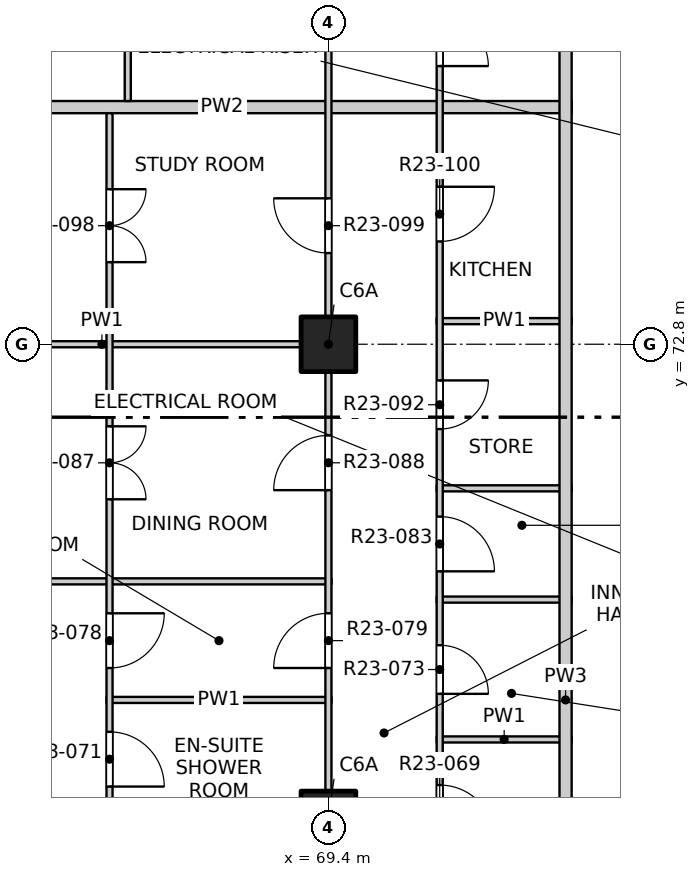
"""IFC4 building model, lengths in metres.
Left out: names, types, materials, properties, quantities, classifications, styles, units other than length and angle.
Written with IfcOpenShell. Run it as: python <this file> out.ifc"""

import sys

from ifc_helpers import new_model, si_unit, direction, frame, frame_2d, origin, origin_2d, place, context, subcontext, project, spatial, rectangle, extrude, element, fill, save


model = new_model("IFC4")
c1 = context("Model", 3, precision=1e-05, world=origin(), true_north=direction((0.0, 1.0)))
c2 = subcontext(c1, "Body", "Model", "MODEL_VIEW")
j1 = project(units=[si_unit("LENGTHUNIT", "METRE"), si_unit("PLANEANGLEUNIT", "RADIAN")], contexts=[c1])
p1 = place(None, origin())
s1 = spatial("IfcSite", under=j1, at=p1, CompositionType="ELEMENT")
p2 = place(p1, origin())
s2 = spatial("IfcBuilding", under=s1, at=p2, CompositionType="ELEMENT")
p3 = place(p2, frame((0.0, 0.0, 234.7)))
s3 = spatial("IfcBuildingStorey", under=s2, at=p3, CompositionType="ELEMENT", Elevation=234.7)
for number, where, z_axis, x_axis in (
    (1, (69.4, 65.0, -0.25), (0.0, 0.0, 1.0), (1.0, 0.0, 0.0)),
    (2, (69.4, 72.8, -0.25), (0.0, 0.0, 1.0), (1.0, 0.0, 0.0)),
):
    element("IfcColumn", number, at=place(p3, frame(where, z_axis=z_axis, x_axis=x_axis)), inside=s3, PredefinedType="COLUMN", context=c2, shape_type="SweptSolid", body=[
        extrude(rectangle(XDim=0.9, YDim=0.9, at=origin_2d()), origin(), (0.0, 0.0, 1.0), 3.4),
    ])
p4 = place(p3, frame((71.18, 66.3, 0.0), z_axis=(0.0, 0.0, 1.0), x_axis=(1.0, 0.0, 0.0)))
e3 = element("IfcWall", 3, at=p4, inside=s3, PredefinedType="PARTITIONING", context=c2, shape_type="SweptSolid", body=[
    extrude(rectangle(XDim=2.22, YDim=0.1, at=frame_2d((1.11, 0.0))), origin(), (0.0, 0.0, 1.0), 3.15),
])
p5 = place(p3, frame((65.75, 66.95, 0.0), z_axis=(0.0, 0.0, 1.0), x_axis=(1.0, 0.0, 0.0)))
e4 = element("IfcWall", 4, at=p5, inside=s3, PredefinedType="PARTITIONING", context=c2, shape_type="SweptSolid", body=[
    extrude(rectangle(XDim=3.7, YDim=0.1, at=frame_2d((1.85, 0.0))), origin(), (0.0, 0.0, 1.0), 3.15),
])
p6 = place(p3, frame((71.18, 68.6, 0.0), z_axis=(0.0, 0.0, 1.0), x_axis=(1.0, 0.0, 0.0)))
e5 = element("IfcWall", 5, at=p6, inside=s3, PredefinedType="PARTITIONING", context=c2, shape_type="SweptSolid", body=[
    extrude(rectangle(XDim=2.22, YDim=0.1, at=frame_2d((1.11, 0.0))), origin(), (0.0, 0.0, 1.0), 3.15),
])
p7 = place(p3, frame((61.9, 68.9, 0.0), z_axis=(0.0, 0.0, 1.0), x_axis=(1.0, 0.0, 0.0)))
e6 = element("IfcWall", 6, at=p7, inside=s3, PredefinedType="PARTITIONING", context=c2, shape_type="SweptSolid", body=[
    extrude(rectangle(XDim=7.55, YDim=0.1, at=frame_2d((3.775, 0.0))), origin(), (0.0, 0.0, 1.0), 2.55),
])
p8 = place(p3, frame((71.18, 70.43, 0.0), z_axis=(0.0, 0.0, 1.0), x_axis=(1.0, 0.0, 0.0)))
e7 = element("IfcWall", 7, at=p8, inside=s3, PredefinedType="PARTITIONING", context=c2, shape_type="SweptSolid", body=[
    extrude(rectangle(XDim=2.22, YDim=0.1, at=frame_2d((1.11, 0.0))), origin(), (0.0, 0.0, 1.0), 3.15),
])
p9 = place(p3, frame((61.9, 72.8, 0.0), z_axis=(0.0, 0.0, 1.0), x_axis=(1.0, 0.0, 0.0)))
e8 = element("IfcWall", 8, at=p9, inside=s3, PredefinedType="PARTITIONING", context=c2, shape_type="SweptSolid", body=[
    extrude(rectangle(XDim=7.55, YDim=0.1, at=frame_2d((3.775, 0.0))), origin(), (0.0, 0.0, 1.0), 3.15),
])
p10 = place(p3, frame((71.18, 73.18, 0.0), z_axis=(0.0, 0.0, 1.0), x_axis=(1.0, 0.0, 0.0)))
e9 = element("IfcWall", 9, at=p10, inside=s3, PredefinedType="PARTITIONING", context=c2, shape_type="SweptSolid", body=[
    extrude(rectangle(XDim=2.22, YDim=0.1, at=frame_2d((1.11, 0.0))), origin(), (0.0, 0.0, 1.0), 3.15),
])
p11 = place(p3, frame((61.9, 76.7, 0.0), z_axis=(0.0, 0.0, 1.0), x_axis=(1.0, 0.0, 0.0)))
e10 = element("IfcWall", 10, at=p11, inside=s3, PredefinedType="PARTITIONING", context=c2, shape_type="SweptSolid", body=[
    extrude(rectangle(XDim=11.5, YDim=0.2, at=frame_2d((5.75, 0.0))), origin(), (0.0, 0.0, 1.0), 2.55),
])
p12 = place(p3, frame((65.8, 61.2, 0.0), z_axis=(0.0, 0.0, 1.0), x_axis=(0.0, 1.0, 0.0)))
e11 = element("IfcWall", 11, at=p12, inside=s3, PredefinedType="PARTITIONING", context=c2, shape_type="SweptSolid", body=[
    extrude(rectangle(XDim=15.4, YDim=0.1, at=frame_2d((7.7, 0.0))), origin(), (0.0, 0.0, 1.0), 3.15),
])
p13 = place(p12, frame((0.425, 0.0, 0.0)))
e12 = element("IfcOpeningElement", 12, at=p13, cuts=e11, PredefinedType="OPENING", context=c2, shape_type="SweptSolid", body=[
    extrude(rectangle(XDim=0.9, YDim=2.1, at=frame_2d((0.45, 1.05))), frame((0.0, 0.06, 0.0), z_axis=(0.0, -1.0, 0.0), x_axis=(1.0, 0.0, 0.0)), (0.0, 0.0, 1.0), 0.12),
])
p14 = place(p12, frame((2.375, 0.0, 0.0)))
e13 = element("IfcOpeningElement", 13, at=p14, cuts=e11, PredefinedType="OPENING", context=c2, shape_type="SweptSolid", body=[
    extrude(rectangle(XDim=0.9, YDim=2.1, at=frame_2d((0.45, 1.05))), frame((0.0, 0.06, 0.0), z_axis=(0.0, -1.0, 0.0), x_axis=(1.0, 0.0, 0.0)), (0.0, 0.0, 1.0), 0.12),
])
p15 = place(p12, frame((4.325, 0.0, 0.0)))
e14 = element("IfcOpeningElement", 14, at=p15, cuts=e11, PredefinedType="OPENING", context=c2, shape_type="SweptSolid", body=[
    extrude(rectangle(XDim=0.9, YDim=2.1, at=frame_2d((0.45, 1.05))), frame((0.0, 0.06, 0.0), z_axis=(0.0, -1.0, 0.0), x_axis=(1.0, 0.0, 0.0)), (0.0, 0.0, 1.0), 0.12),
])
p16 = place(p12, frame((6.275, 0.0, 0.0)))
e15 = element("IfcOpeningElement", 15, at=p16, cuts=e11, PredefinedType="OPENING", context=c2, shape_type="SweptSolid", body=[
    extrude(rectangle(XDim=0.9, YDim=2.1, at=frame_2d((0.45, 1.05))), frame((0.0, 0.06, 0.0), z_axis=(0.0, -1.0, 0.0), x_axis=(1.0, 0.0, 0.0)), (0.0, 0.0, 1.0), 0.12),
])
p17 = place(p12, frame((9.05, 0.0, 0.0)))
e16 = element("IfcOpeningElement", 16, at=p17, cuts=e11, PredefinedType="OPENING", context=c2, shape_type="SweptSolid", body=[
    extrude(rectangle(XDim=1.2, YDim=2.1, at=frame_2d((0.6, 1.05))), frame((0.0, 0.06, 0.0), z_axis=(0.0, -1.0, 0.0), x_axis=(1.0, 0.0, 0.0)), (0.0, 0.0, 1.0), 0.12),
])
p18 = place(p12, frame((12.95, 0.0, 0.0)))
e17 = element("IfcOpeningElement", 17, at=p18, cuts=e11, PredefinedType="OPENING", context=c2, shape_type="SweptSolid", body=[
    extrude(rectangle(XDim=1.2, YDim=2.1, at=frame_2d((0.6, 1.05))), frame((0.0, 0.06, 0.0), z_axis=(0.0, -1.0, 0.0), x_axis=(1.0, 0.0, 0.0)), (0.0, 0.0, 1.0), 0.12),
])
p19 = place(p3, frame((66.1, 76.8, 0.0), z_axis=(0.0, 0.0, 1.0), x_axis=(0.0, 1.0, 0.0)))
e18 = element("IfcWall", 18, at=p19, inside=s3, PredefinedType="PARTITIONING", context=c2, shape_type="SweptSolid", body=[
    extrude(rectangle(XDim=11.3, YDim=0.1, at=frame_2d((5.65, 0.0))), origin(), (0.0, 0.0, 1.0), 3.15),
])
p20 = place(p19, frame((1.25, 0.0, 0.0)))
e19 = element("IfcOpeningElement", 19, at=p20, cuts=e18, PredefinedType="OPENING", context=c2, shape_type="SweptSolid", body=[
    extrude(rectangle(XDim=1.2, YDim=2.1, at=frame_2d((0.6, 1.05))), frame((0.0, 0.06, 0.0), z_axis=(0.0, -1.0, 0.0), x_axis=(1.0, 0.0, 0.0)), (0.0, 0.0, 1.0), 0.12),
])
p21 = place(p19, frame((5.15, 0.0, 0.0)))
e20 = element("IfcOpeningElement", 20, at=p21, cuts=e18, PredefinedType="OPENING", context=c2, shape_type="SweptSolid", body=[
    extrude(rectangle(XDim=1.2, YDim=2.1, at=frame_2d((0.6, 1.05))), frame((0.0, 0.06, 0.0), z_axis=(0.0, -1.0, 0.0), x_axis=(1.0, 0.0, 0.0)), (0.0, 0.0, 1.0), 0.12),
])
p22 = place(p19, frame((9.05, 0.0, 0.0)))
e21 = element("IfcOpeningElement", 21, at=p22, cuts=e18, PredefinedType="OPENING", context=c2, shape_type="SweptSolid", body=[
    extrude(rectangle(XDim=1.2, YDim=2.1, at=frame_2d((0.6, 1.05))), frame((0.0, 0.06, 0.0), z_axis=(0.0, -1.0, 0.0), x_axis=(1.0, 0.0, 0.0)), (0.0, 0.0, 1.0), 0.12),
])
p23 = place(p3, frame((69.4, 41.9, 0.0), z_axis=(0.0, 0.0, 1.0), x_axis=(0.0, 1.0, 0.0)))
e22 = element("IfcWall", 22, at=p23, inside=s3, PredefinedType="PARTITIONING", context=c2, shape_type="SweptSolid", body=[
    extrude(rectangle(XDim=46.2, YDim=0.1, at=frame_2d((23.1, 0.0))), origin(), (0.0, 0.0, 1.0), 3.15),
])
p24 = place(p23, frame((1.2, 0.0, 0.0)))
e23 = element("IfcOpeningElement", 23, at=p24, cuts=e22, PredefinedType="OPENING", context=c2, shape_type="SweptSolid", body=[
    extrude(rectangle(XDim=0.9, YDim=2.1, at=frame_2d((0.45, 1.05))), frame((0.0, 0.06, 0.0), z_axis=(0.0, -1.0, 0.0), x_axis=(1.0, 0.0, 0.0)), (0.0, 0.0, 1.0), 0.12),
])
p25 = place(p23, frame((6.025, 0.0, 0.0)))
e24 = element("IfcOpeningElement", 24, at=p25, cuts=e22, PredefinedType="OPENING", context=c2, shape_type="SweptSolid", body=[
    extrude(rectangle(XDim=0.9, YDim=2.1, at=frame_2d((0.45, 1.05))), frame((0.0, 0.06, 0.0), z_axis=(0.0, -1.0, 0.0), x_axis=(1.0, 0.0, 0.0)), (0.0, 0.0, 1.0), 0.12),
])
p26 = place(p23, frame((9.975, 0.0, 0.0)))
e25 = element("IfcOpeningElement", 25, at=p26, cuts=e22, PredefinedType="OPENING", context=c2, shape_type="SweptSolid", body=[
    extrude(rectangle(XDim=0.9, YDim=2.1, at=frame_2d((0.45, 1.05))), frame((0.0, 0.06, 0.0), z_axis=(0.0, -1.0, 0.0), x_axis=(1.0, 0.0, 0.0)), (0.0, 0.0, 1.0), 0.12),
])
p27 = place(p23, frame((12.9, 0.0, 0.0)))
e26 = element("IfcOpeningElement", 26, at=p27, cuts=e22, PredefinedType="OPENING", context=c2, shape_type="SweptSolid", body=[
    extrude(rectangle(XDim=0.9, YDim=2.1, at=frame_2d((0.45, 1.05))), frame((0.0, 0.06, 0.0), z_axis=(0.0, -1.0, 0.0), x_axis=(1.0, 0.0, 0.0)), (0.0, 0.0, 1.0), 0.12),
])
p28 = place(p23, frame((17.775, 0.0, 0.0)))
e27 = element("IfcOpeningElement", 27, at=p28, cuts=e22, PredefinedType="OPENING", context=c2, shape_type="SweptSolid", body=[
    extrude(rectangle(XDim=0.9, YDim=2.1, at=frame_2d((0.45, 1.05))), frame((0.0, 0.06, 0.0), z_axis=(0.0, -1.0, 0.0), x_axis=(1.0, 0.0, 0.0)), (0.0, 0.0, 1.0), 0.12),
])
p29 = place(p23, frame((21.625, 0.0, 0.0)))
e28 = element("IfcOpeningElement", 28, at=p29, cuts=e22, PredefinedType="OPENING", context=c2, shape_type="SweptSolid", body=[
    extrude(rectangle(XDim=0.9, YDim=2.1, at=frame_2d((0.45, 1.05))), frame((0.0, 0.06, 0.0), z_axis=(0.0, -1.0, 0.0), x_axis=(1.0, 0.0, 0.0)), (0.0, 0.0, 1.0), 0.12),
])
p30 = place(p23, frame((25.575, 0.0, 0.0)))
e29 = element("IfcOpeningElement", 29, at=p30, cuts=e22, PredefinedType="OPENING", context=c2, shape_type="SweptSolid", body=[
    extrude(rectangle(XDim=0.9, YDim=2.1, at=frame_2d((0.45, 1.05))), frame((0.0, 0.06, 0.0), z_axis=(0.0, -1.0, 0.0), x_axis=(1.0, 0.0, 0.0)), (0.0, 0.0, 1.0), 0.12),
])
p31 = place(p23, frame((28.5, 0.0, 0.0)))
e30 = element("IfcOpeningElement", 30, at=p31, cuts=e22, PredefinedType="OPENING", context=c2, shape_type="SweptSolid", body=[
    extrude(rectangle(XDim=0.9, YDim=2.1, at=frame_2d((0.45, 1.05))), frame((0.0, 0.06, 0.0), z_axis=(0.0, -1.0, 0.0), x_axis=(1.0, 0.0, 0.0)), (0.0, 0.0, 1.0), 0.12),
])
p32 = place(p23, frame((32.4, 0.0, 0.0)))
e31 = element("IfcOpeningElement", 31, at=p32, cuts=e22, PredefinedType="OPENING", context=c2, shape_type="SweptSolid", body=[
    extrude(rectangle(XDim=0.9, YDim=2.1, at=frame_2d((0.45, 1.05))), frame((0.0, 0.06, 0.0), z_axis=(0.0, -1.0, 0.0), x_axis=(1.0, 0.0, 0.0)), (0.0, 0.0, 1.0), 0.12),
])
p33 = place(p23, frame((36.3, 0.0, 0.0)))
e32 = element("IfcOpeningElement", 32, at=p33, cuts=e22, PredefinedType="OPENING", context=c2, shape_type="SweptSolid", body=[
    extrude(rectangle(XDim=0.9, YDim=2.1, at=frame_2d((0.45, 1.05))), frame((0.0, 0.06, 0.0), z_axis=(0.0, -1.0, 0.0), x_axis=(1.0, 0.0, 0.0)), (0.0, 0.0, 1.0), 0.12),
])
p34 = place(p23, frame((40.2, 0.0, 0.0)))
e33 = element("IfcOpeningElement", 33, at=p34, cuts=e22, PredefinedType="OPENING", context=c2, shape_type="SweptSolid", body=[
    extrude(rectangle(XDim=0.9, YDim=2.1, at=frame_2d((0.45, 1.05))), frame((0.0, 0.06, 0.0), z_axis=(0.0, -1.0, 0.0), x_axis=(1.0, 0.0, 0.0)), (0.0, 0.0, 1.0), 0.12),
])
p35 = place(p23, frame((44.1, 0.0, 0.0)))
e34 = element("IfcOpeningElement", 34, at=p35, cuts=e22, PredefinedType="OPENING", context=c2, shape_type="SweptSolid", body=[
    extrude(rectangle(XDim=0.9, YDim=2.1, at=frame_2d((0.45, 1.05))), frame((0.0, 0.06, 0.0), z_axis=(0.0, -1.0, 0.0), x_axis=(1.0, 0.0, 0.0)), (0.0, 0.0, 1.0), 0.12),
])
p36 = place(p3, frame((71.23, 63.95, 0.0), z_axis=(0.0, 0.0, 1.0), x_axis=(0.0, 1.0, 0.0)))
e35 = element("IfcWall", 35, at=p36, inside=s3, PredefinedType="PARTITIONING", context=c2, shape_type="SweptSolid", body=[
    extrude(rectangle(XDim=17.85, YDim=0.1, at=frame_2d((8.925, 0.0))), origin(), (0.0, 0.0, 1.0), 3.15),
])
p37 = place(p36, frame((0.7, 0.0, 0.0)))
e36 = element("IfcOpeningElement", 36, at=p37, cuts=e35, PredefinedType="OPENING", context=c2, shape_type="SweptSolid", body=[
    extrude(rectangle(XDim=0.9, YDim=2.1, at=frame_2d((0.45, 1.05))), frame((0.0, 0.06, 0.0), z_axis=(0.0, -1.0, 0.0), x_axis=(1.0, 0.0, 0.0)), (0.0, 0.0, 1.0), 0.12),
])
p38 = place(p36, frame((3.1, 0.0, 0.0)))
e37 = element("IfcOpeningElement", 37, at=p38, cuts=e35, PredefinedType="OPENING", context=c2, shape_type="SweptSolid", body=[
    extrude(rectangle(XDim=0.8, YDim=2.1, at=frame_2d((0.4, 1.05))), frame((0.0, 0.06, 0.0), z_axis=(0.0, -1.0, 0.0), x_axis=(1.0, 0.0, 0.0)), (0.0, 0.0, 1.0), 0.12),
])
p39 = place(p36, frame((5.115, 0.0, 0.0)))
e38 = element("IfcOpeningElement", 38, at=p39, cuts=e35, PredefinedType="OPENING", context=c2, shape_type="SweptSolid", body=[
    extrude(rectangle(XDim=0.9, YDim=2.1, at=frame_2d((0.45, 1.05))), frame((0.0, 0.06, 0.0), z_axis=(0.0, -1.0, 0.0), x_axis=(1.0, 0.0, 0.0)), (0.0, 0.0, 1.0), 0.12),
])
p40 = place(p36, frame((7.455, 0.0, 0.0)))
e39 = element("IfcOpeningElement", 39, at=p40, cuts=e35, PredefinedType="OPENING", context=c2, shape_type="SweptSolid", body=[
    extrude(rectangle(XDim=0.8, YDim=2.1, at=frame_2d((0.4, 1.05))), frame((0.0, 0.06, 0.0), z_axis=(0.0, -1.0, 0.0), x_axis=(1.0, 0.0, 0.0)), (0.0, 0.0, 1.0), 0.12),
])
p41 = place(p36, frame((10.54, 0.0, 0.0)))
e40 = element("IfcOpeningElement", 40, at=p41, cuts=e35, PredefinedType="OPENING", context=c2, shape_type="SweptSolid", body=[
    extrude(rectangle(XDim=0.9, YDim=2.1, at=frame_2d((0.45, 1.05))), frame((0.0, 0.06, 0.0), z_axis=(0.0, -1.0, 0.0), x_axis=(1.0, 0.0, 0.0)), (0.0, 0.0, 1.0), 0.12),
])
p42 = place(p36, frame((13.425, 0.0, 0.0)))
e41 = element("IfcOpeningElement", 41, at=p42, cuts=e35, PredefinedType="OPENING", context=c2, shape_type="SweptSolid", body=[
    extrude(rectangle(XDim=0.8, YDim=2.1, at=frame_2d((0.4, 1.05))), frame((0.0, 0.06, 0.0), z_axis=(0.0, -1.0, 0.0), x_axis=(1.0, 0.0, 0.0)), (0.0, 0.0, 1.0), 0.12),
])
p43 = place(p36, frame((15.95, 0.0, 0.0)))
e42 = element("IfcOpeningElement", 42, at=p43, cuts=e35, PredefinedType="OPENING", context=c2, shape_type="SweptSolid", body=[
    extrude(rectangle(XDim=0.9, YDim=2.1, at=frame_2d((0.45, 1.05))), frame((0.0, 0.06, 0.0), z_axis=(0.0, -1.0, 0.0), x_axis=(1.0, 0.0, 0.0)), (0.0, 0.0, 1.0), 0.12),
])
p44 = place(p3, frame((73.3, 49.5, 0.0), z_axis=(0.0, 0.0, 1.0), x_axis=(0.0, 1.0, 0.0)))
e43 = element("IfcWall", 43, at=p44, inside=s3, PredefinedType="PARTITIONING", context=c2, shape_type="SweptSolid", body=[
    extrude(rectangle(XDim=34.9, YDim=0.2, at=frame_2d((17.45, 0.0))), origin(), (0.0, 0.0, 1.0), 3.15),
])
p45 = place(p44, frame((3.075, 0.0, 0.0)))
e44 = element("IfcOpeningElement", 44, at=p45, cuts=e43, PredefinedType="OPENING", context=c2, shape_type="SweptSolid", body=[
    extrude(rectangle(XDim=1.0, YDim=2.1, at=frame_2d((0.5, 1.05))), frame((0.0, 0.11, 0.0), z_axis=(0.0, -1.0, 0.0), x_axis=(1.0, 0.0, 0.0)), (0.0, 0.0, 1.0), 0.22),
])
p46 = place(p44, frame((14.575, 0.0, 0.0)))
e45 = element("IfcOpeningElement", 45, at=p46, cuts=e43, PredefinedType="OPENING", context=c2, shape_type="SweptSolid", body=[
    extrude(rectangle(XDim=1.0, YDim=2.1, at=frame_2d((0.5, 1.05))), frame((0.0, 0.11, 0.0), z_axis=(0.0, -1.0, 0.0), x_axis=(1.0, 0.0, 0.0)), (0.0, 0.0, 1.0), 0.22),
])
p47 = place(p44, frame((33.625, 0.0, 0.0)))
e46 = element("IfcOpeningElement", 46, at=p47, cuts=e43, PredefinedType="OPENING", context=c2, shape_type="SweptSolid", body=[
    extrude(rectangle(XDim=1.0, YDim=2.1, at=frame_2d((0.5, 1.05))), frame((0.0, 0.11, 0.0), z_axis=(0.0, -1.0, 0.0), x_axis=(1.0, 0.0, 0.0)), (0.0, 0.0, 1.0), 0.22),
])
p48 = place(p37, origin())
e47 = element("IfcDoor", 47, at=p48, inside=s3, OperationType="SINGLE_SWING_RIGHT", PredefinedType="DOOR", context=c2, shape_type="SweptSolid", body=[
    extrude(rectangle(XDim=0.9, YDim=2.1, at=frame_2d((0.45, 1.05))), frame((0.0, 0.025, 0.0), z_axis=(0.0, -1.0, 0.0), x_axis=(1.0, 0.0, 0.0)), (0.0, 0.0, 1.0), 0.05),
])
fill(e36, e47)
p49 = place(p15, origin())
e48 = element("IfcDoor", 48, at=p49, inside=s3, OperationType="SINGLE_SWING_RIGHT", PredefinedType="DOOR", context=c2, shape_type="SweptSolid", body=[
    extrude(rectangle(XDim=0.9, YDim=2.1, at=frame_2d((0.45, 1.05))), frame((0.0, 0.025, 0.0), z_axis=(0.0, -1.0, 0.0), x_axis=(1.0, 0.0, 0.0)), (0.0, 0.0, 1.0), 0.05),
])
fill(e14, e48)
p50 = place(p38, origin())
e49 = element("IfcDoor", 49, at=p50, inside=s3, OperationType="SINGLE_SWING_RIGHT", PredefinedType="DOOR", context=c2, shape_type="SweptSolid", body=[
    extrude(rectangle(XDim=0.8, YDim=2.1, at=frame_2d((0.4, 1.05))), frame((0.0, 0.025, 0.0), z_axis=(0.0, -1.0, 0.0), x_axis=(1.0, 0.0, 0.0)), (0.0, 0.0, 1.0), 0.05),
])
fill(e37, e49)
p51 = place(p16, origin())
e50 = element("IfcDoor", 50, at=p51, inside=s3, OperationType="SINGLE_SWING_LEFT", PredefinedType="DOOR", context=c2, shape_type="SweptSolid", body=[
    extrude(rectangle(XDim=0.9, YDim=2.1, at=frame_2d((0.45, 1.05))), frame((0.0, 0.025, 0.0), z_axis=(0.0, -1.0, 0.0), x_axis=(1.0, 0.0, 0.0)), (0.0, 0.0, 1.0), 0.05),
])
fill(e15, e50)
p52 = place(p30, origin())
e51 = element("IfcDoor", 51, at=p52, inside=s3, OperationType="SINGLE_SWING_LEFT", PredefinedType="DOOR", context=c2, shape_type="SweptSolid", body=[
    extrude(rectangle(XDim=0.9, YDim=2.1, at=frame_2d((0.45, 1.05))), frame((0.0, 0.025, 0.0), z_axis=(0.0, -1.0, 0.0), x_axis=(1.0, 0.0, 0.0)), (0.0, 0.0, 1.0), 0.05),
])
fill(e29, e51)
p53 = place(p39, origin())
e52 = element("IfcDoor", 52, at=p53, inside=s3, OperationType="SINGLE_SWING_RIGHT", PredefinedType="DOOR", context=c2, shape_type="SweptSolid", body=[
    extrude(rectangle(XDim=0.9, YDim=2.1, at=frame_2d((0.45, 1.05))), frame((0.0, 0.025, 0.0), z_axis=(0.0, -1.0, 0.0), x_axis=(1.0, 0.0, 0.0)), (0.0, 0.0, 1.0), 0.05),
])
fill(e38, e52)
p54 = place(p17, origin())
e53 = element("IfcDoor", 53, at=p54, inside=s3, OperationType="DOUBLE_DOOR_SINGLE_SWING", PredefinedType="DOOR", context=c2, shape_type="SweptSolid", body=[
    extrude(rectangle(XDim=1.2, YDim=2.1, at=frame_2d((0.6, 1.05))), frame((0.0, 0.025, 0.0), z_axis=(0.0, -1.0, 0.0), x_axis=(1.0, 0.0, 0.0)), (0.0, 0.0, 1.0), 0.05),
])
fill(e16, e53)
p55 = place(p31, origin())
e54 = element("IfcDoor", 54, at=p55, inside=s3, OperationType="SINGLE_SWING_LEFT", PredefinedType="DOOR", context=c2, shape_type="SweptSolid", body=[
    extrude(rectangle(XDim=0.9, YDim=2.1, at=frame_2d((0.45, 1.05))), frame((0.0, 0.025, 0.0), z_axis=(0.0, -1.0, 0.0), x_axis=(1.0, 0.0, 0.0)), (0.0, 0.0, 1.0), 0.05),
])
fill(e30, e54)
p56 = place(p40, origin())
e55 = element("IfcDoor", 55, at=p56, inside=s3, OperationType="SINGLE_SWING_LEFT", PredefinedType="DOOR", context=c2, shape_type="SweptSolid", body=[
    extrude(rectangle(XDim=0.8, YDim=2.1, at=frame_2d((0.4, 1.05))), frame((0.0, 0.025, 0.0), z_axis=(0.0, -1.0, 0.0), x_axis=(1.0, 0.0, 0.0)), (0.0, 0.0, 1.0), 0.05),
])
fill(e39, e55)
p57 = place(p18, origin())
e56 = element("IfcDoor", 56, at=p57, inside=s3, OperationType="DOUBLE_DOOR_SINGLE_SWING", PredefinedType="DOOR", context=c2, shape_type="SweptSolid", body=[
    extrude(rectangle(XDim=1.2, YDim=2.1, at=frame_2d((0.6, 1.05))), frame((0.0, 0.025, 0.0), z_axis=(0.0, -1.0, 0.0), x_axis=(1.0, 0.0, 0.0)), (0.0, 0.0, 1.0), 0.05),
])
fill(e17, e56)
p58 = place(p32, origin())
e57 = element("IfcDoor", 57, at=p58, inside=s3, OperationType="SINGLE_SWING_RIGHT", PredefinedType="DOOR", context=c2, shape_type="SweptSolid", body=[
    extrude(rectangle(XDim=0.9, YDim=2.1, at=frame_2d((0.45, 1.05))), frame((0.0, 0.025, 0.0), z_axis=(0.0, -1.0, 0.0), x_axis=(1.0, 0.0, 0.0)), (0.0, 0.0, 1.0), 0.05),
])
fill(e31, e57)
p59 = place(p41, origin())
e58 = element("IfcDoor", 58, at=p59, inside=s3, OperationType="SINGLE_SWING_LEFT", PredefinedType="DOOR", context=c2, shape_type="SweptSolid", body=[
    extrude(rectangle(XDim=0.9, YDim=2.1, at=frame_2d((0.45, 1.05))), frame((0.0, 0.025, 0.0), z_axis=(0.0, -1.0, 0.0), x_axis=(1.0, 0.0, 0.0)), (0.0, 0.0, 1.0), 0.05),
])
fill(e40, e58)
p60 = place(p42, origin())
e59 = element("IfcDoor", 59, at=p60, inside=s3, OperationType="SINGLE_SWING_RIGHT", PredefinedType="DOOR", context=c2, shape_type="SweptSolid", body=[
    extrude(rectangle(XDim=0.8, YDim=2.1, at=frame_2d((0.4, 1.05))), frame((0.0, 0.025, 0.0), z_axis=(0.0, -1.0, 0.0), x_axis=(1.0, 0.0, 0.0)), (0.0, 0.0, 1.0), 0.05),
])
fill(e41, e59)
save(model, sys.argv[1])
